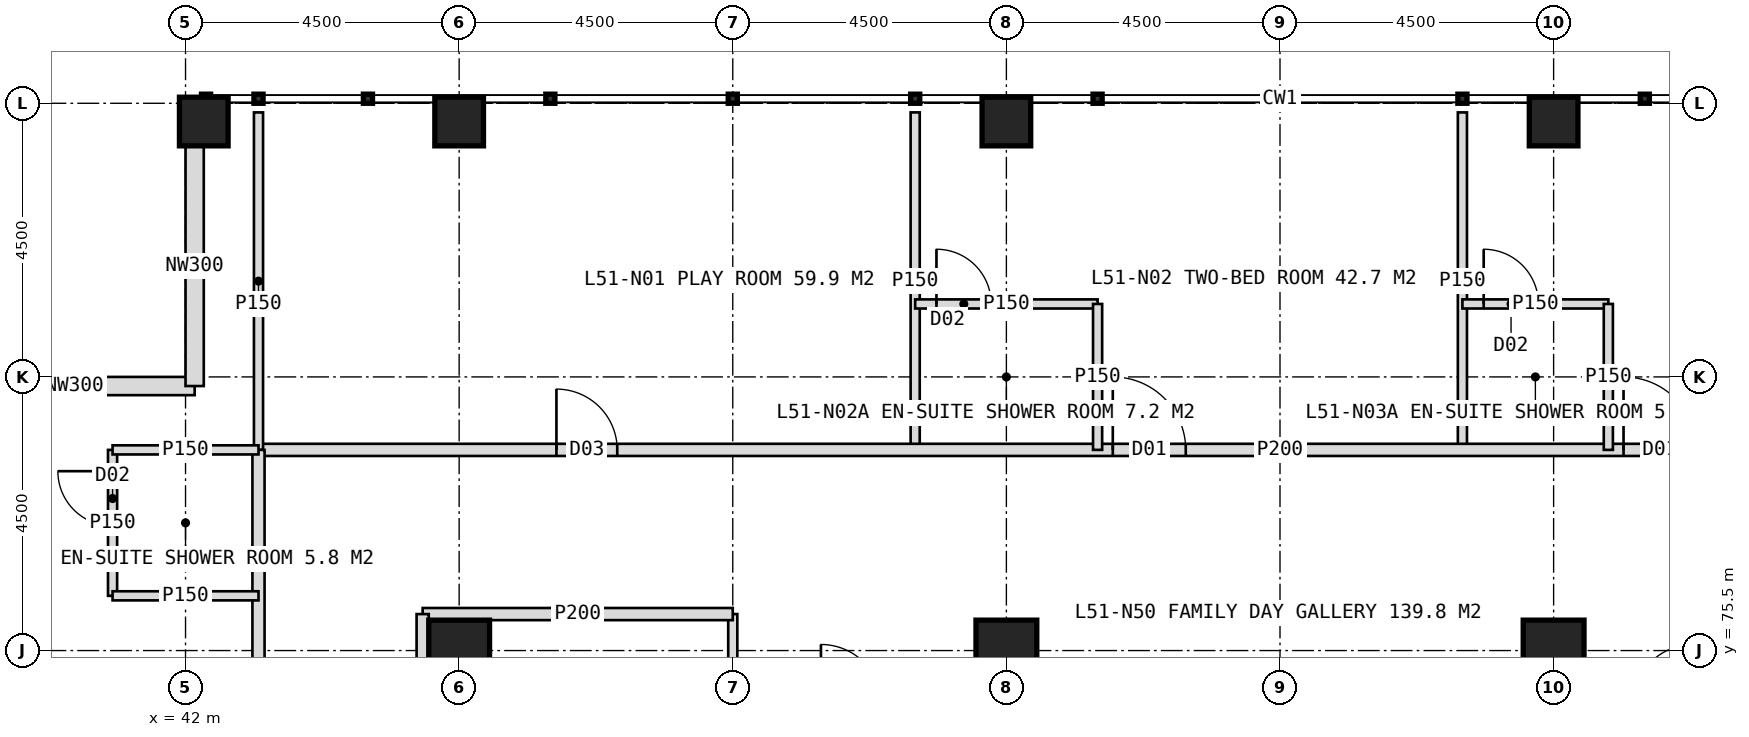
"""IFC4 building model, lengths in metres.
Left out: names, types, materials, properties, quantities, classifications, styles, units other than length and angle.
Written with IfcOpenShell. Run it as: python <this file> out.ifc"""

import sys

from ifc_helpers import new_model, si_unit, direction, frame, frame_2d, origin, origin_2d, place, context, subcontext, project, spatial, rectangle, hollow_rectangle, extrude, element, fill, save


model = new_model("IFC4")
c1 = context("Model", 3, precision=1e-05, world=origin(), true_north=direction((0.0, 1.0)))
c2 = subcontext(c1, "Body", "Model", "MODEL_VIEW")
j1 = project(units=[si_unit("LENGTHUNIT", "METRE"), si_unit("PLANEANGLEUNIT", "RADIAN")], contexts=[c1])
p1 = place(None, origin())
s1 = spatial("IfcSite", under=j1, at=p1, CompositionType="ELEMENT")
p2 = place(p1, origin())
s2 = spatial("IfcBuilding", under=s1, at=p2, CompositionType="ELEMENT")
p3 = place(p2, frame((0.0, 0.0, 213.0)))
s3 = spatial("IfcBuildingStorey", under=s2, at=p3, CompositionType="ELEMENT", Elevation=213.0)
for number, where, z_axis, x_axis in (
    (1, (46.5, 75.5, 0.0), (0.0, 0.0, 1.0), (1.0, 0.0, 0.0)),
    (2, (55.5, 75.5, 0.0), (0.0, 0.0, 1.0), (1.0, 0.0, 0.0)),
    (3, (64.5, 75.5, 0.0), (0.0, 0.0, 1.0), (1.0, 0.0, 0.0)),
):
    element("IfcColumn", number, at=place(p3, frame(where, z_axis=z_axis, x_axis=x_axis)), inside=s3, PredefinedType="COLUMN", context=c2, shape_type="SweptSolid", body=[
        extrude(hollow_rectangle(XDim=1.0, YDim=1.0, WallThickness=0.1, at=origin_2d()), origin(), (0.0, 0.0, 1.0), 4.0),
    ])
for number, where, z_axis, x_axis in (
    (4, (42.3, 84.2, 0.0), (0.0, 0.0, 1.0), (1.0, 0.0, 0.0)),
    (5, (46.5, 84.2, 0.0), (0.0, 0.0, 1.0), (1.0, 0.0, 0.0)),
    (6, (55.5, 84.2, 0.0), (0.0, 0.0, 1.0), (1.0, 0.0, 0.0)),
    (7, (64.5, 84.2, 0.0), (0.0, 0.0, 1.0), (1.0, 0.0, 0.0)),
):
    element("IfcColumn", number, at=place(p3, frame(where, z_axis=z_axis, x_axis=x_axis)), inside=s3, PredefinedType="COLUMN", context=c2, shape_type="SweptSolid", body=[
        extrude(hollow_rectangle(XDim=0.8, YDim=0.8, WallThickness=0.08, at=origin_2d()), origin(), (0.0, 0.0, 1.0), 4.0),
    ])
for number, where, z_axis, x_axis in (
    (8, (38.2, 79.85, 0.0), (0.0, 0.0, 1.0), (1.0, 0.0, 0.0)),
    (9, (42.15, 79.85, 0.0), (0.0, 0.0, 1.0), (0.0, 1.0, 0.0)),
):
    element("IfcWall", number, at=place(p3, frame(where, z_axis=z_axis, x_axis=x_axis)), inside=s3, PredefinedType="ELEMENTEDWALL", context=c2, shape_type="SweptSolid", body=[
        extrude(rectangle(XDim=3.95, YDim=0.3, at=frame_2d((1.975, 0.0))), origin(), (0.0, 0.0, 1.0), 2.85),
    ])
for number, where, z_axis, x_axis in (
    (10, (54.0, 78.8, 0.0), (0.0, 0.0, 1.0), (0.0, 1.0, 0.0)),
    (11, (63.0, 78.8, 0.0), (0.0, 0.0, 1.0), (0.0, 1.0, 0.0)),
):
    element("IfcWall", number, at=place(p3, frame(where, z_axis=z_axis, x_axis=x_axis)), inside=s3, PredefinedType="PARTITIONING", context=c2, shape_type="SweptSolid", body=[
        extrude(rectangle(XDim=5.55, YDim=0.15, at=frame_2d((2.775, 0.0))), origin(), (0.0, 0.0, 1.0), 3.75),
    ])
p4 = place(p3, frame((43.2, 78.8, 0.0), z_axis=(0.0, 0.0, 1.0), x_axis=(1.0, 0.0, 0.0)))
e12 = element("IfcWall", 12, at=p4, inside=s3, PredefinedType="PARTITIONING", context=c2, shape_type="SweptSolid", body=[
    extrude(rectangle(XDim=33.6, YDim=0.2, at=frame_2d((16.8, 0.0))), origin(), (0.0, 0.0, 1.0), 3.75),
])
p5 = place(p4, frame((4.9, 0.0, 0.0)))
e13 = element("IfcOpeningElement", 13, at=p5, cuts=e12, PredefinedType="OPENING", context=c2, shape_type="SweptSolid", body=[
    extrude(rectangle(XDim=1.0, YDim=2.1, at=frame_2d((0.5, 1.05))), frame((0.0, 0.11, 0.0), z_axis=(0.0, -1.0, 0.0), x_axis=(1.0, 0.0, 0.0)), (0.0, 0.0, 1.0), 0.22),
])
p6 = place(p4, frame((14.05, 0.0, 0.0)))
e14 = element("IfcOpeningElement", 14, at=p6, cuts=e12, PredefinedType="OPENING", context=c2, shape_type="SweptSolid", body=[
    extrude(rectangle(XDim=1.2, YDim=2.2, at=frame_2d((0.6, 1.1))), frame((0.0, 0.11, 0.0), z_axis=(0.0, -1.0, 0.0), x_axis=(1.0, 0.0, 0.0)), (0.0, 0.0, 1.0), 0.22),
])
p7 = place(p4, frame((22.45, 0.0, 0.0)))
e15 = element("IfcOpeningElement", 15, at=p7, cuts=e12, PredefinedType="OPENING", context=c2, shape_type="SweptSolid", body=[
    extrude(rectangle(XDim=1.2, YDim=2.2, at=frame_2d((0.6, 1.1))), frame((0.0, 0.11, 0.0), z_axis=(0.0, -1.0, 0.0), x_axis=(1.0, 0.0, 0.0)), (0.0, 0.0, 1.0), 0.22),
])
p8 = place(p3, frame((43.2, 78.8, 0.0), z_axis=(0.0, 0.0, 1.0), x_axis=(0.0, 1.0, 0.0)))
e16 = element("IfcWall", 16, at=p8, inside=s3, PredefinedType="PARTITIONING", context=c2, shape_type="SweptSolid", body=[
    extrude(rectangle(XDim=5.55, YDim=0.15, at=frame_2d((2.775, 0.0))), origin(), (0.0, 0.0, 1.0), 3.75),
])
p9 = place(p3, frame((54.0, 81.2, 0.0), z_axis=(0.0, 0.0, 1.0), x_axis=(1.0, 0.0, 0.0)))
e17 = element("IfcWall", 17, at=p9, inside=s3, PredefinedType="PARTITIONING", context=c2, shape_type="SweptSolid", body=[
    extrude(rectangle(XDim=3.0, YDim=0.15, at=frame_2d((1.5, 0.0))), origin(), (0.0, 0.0, 1.0), 3.75),
])
p10 = place(p9, frame((0.35, 0.0, 0.0)))
e18 = element("IfcOpeningElement", 18, at=p10, cuts=e17, PredefinedType="OPENING", context=c2, shape_type="SweptSolid", body=[
    extrude(rectangle(XDim=0.9, YDim=2.1, at=frame_2d((0.45, 1.05))), frame((0.0, 0.085, 0.0), z_axis=(0.0, -1.0, 0.0), x_axis=(1.0, 0.0, 0.0)), (0.0, 0.0, 1.0), 0.17),
])
p11 = place(p3, frame((57.0, 78.8, 0.0), z_axis=(0.0, 0.0, 1.0), x_axis=(0.0, 1.0, 0.0)))
e19 = element("IfcWall", 19, at=p11, inside=s3, PredefinedType="PARTITIONING", context=c2, shape_type="SweptSolid", body=[
    extrude(rectangle(XDim=2.4, YDim=0.15, at=frame_2d((1.2, 0.0))), origin(), (0.0, 0.0, 1.0), 3.75),
])
p12 = place(p3, frame((63.0, 81.2, 0.0), z_axis=(0.0, 0.0, 1.0), x_axis=(1.0, 0.0, 0.0)))
e20 = element("IfcWall", 20, at=p12, inside=s3, PredefinedType="PARTITIONING", context=c2, shape_type="SweptSolid", body=[
    extrude(rectangle(XDim=2.4, YDim=0.15, at=frame_2d((1.2, 0.0))), origin(), (0.0, 0.0, 1.0), 3.75),
])
p13 = place(p12, frame((0.35, 0.0, 0.0)))
e21 = element("IfcOpeningElement", 21, at=p13, cuts=e20, PredefinedType="OPENING", context=c2, shape_type="SweptSolid", body=[
    extrude(rectangle(XDim=0.9, YDim=2.1, at=frame_2d((0.45, 1.05))), frame((0.0, 0.085, 0.0), z_axis=(0.0, -1.0, 0.0), x_axis=(1.0, 0.0, 0.0)), (0.0, 0.0, 1.0), 0.17),
])
p14 = place(p3, frame((65.4, 78.8, 0.0), z_axis=(0.0, 0.0, 1.0), x_axis=(0.0, 1.0, 0.0)))
e22 = element("IfcWall", 22, at=p14, inside=s3, PredefinedType="PARTITIONING", context=c2, shape_type="SweptSolid", body=[
    extrude(rectangle(XDim=2.4, YDim=0.15, at=frame_2d((1.2, 0.0))), origin(), (0.0, 0.0, 1.0), 3.75),
])
p15 = place(p3, frame((51.0, 71.0, 0.0), z_axis=(0.0, 0.0, 1.0), x_axis=(0.0, 1.0, 0.0)))
e23 = element("IfcWall", 23, at=p15, inside=s3, PredefinedType="PARTITIONING", context=c2, shape_type="SweptSolid", body=[
    extrude(rectangle(XDim=5.1, YDim=0.15, at=frame_2d((2.55, 0.0))), origin(), (0.0, 0.0, 1.0), 3.75),
])
p16 = place(p3, frame((45.9, 76.1, 0.0), z_axis=(0.0, 0.0, 1.0), x_axis=(1.0, 0.0, 0.0)))
e24 = element("IfcWall", 24, at=p16, inside=s3, PredefinedType="PARTITIONING", context=c2, shape_type="SweptSolid", body=[
    extrude(rectangle(XDim=5.1, YDim=0.2, at=frame_2d((2.55, 0.0))), origin(), (0.0, 0.0, 1.0), 3.75),
])
p17 = place(p3, frame((43.2, 45.2, 0.0), z_axis=(0.0, 0.0, 1.0), x_axis=(0.0, 1.0, 0.0)))
e25 = element("IfcWall", 25, at=p17, inside=s3, PredefinedType="PARTITIONING", context=c2, shape_type="SweptSolid", body=[
    extrude(rectangle(XDim=33.6, YDim=0.2, at=frame_2d((16.8, 0.0))), origin(), (0.0, 0.0, 1.0), 3.75),
])
p18 = place(p17, frame((3.25, 0.0, 0.0)))
e26 = element("IfcOpeningElement", 26, at=p18, cuts=e25, PredefinedType="OPENING", context=c2, shape_type="SweptSolid", body=[
    extrude(rectangle(XDim=1.2, YDim=2.2, at=frame_2d((0.6, 1.1))), frame((0.0, 0.11, 0.0), z_axis=(0.0, -1.0, 0.0), x_axis=(1.0, 0.0, 0.0)), (0.0, 0.0, 1.0), 0.22),
])
p19 = place(p17, frame((11.05, 0.0, 0.0)))
e27 = element("IfcOpeningElement", 27, at=p19, cuts=e25, PredefinedType="OPENING", context=c2, shape_type="SweptSolid", body=[
    extrude(rectangle(XDim=1.2, YDim=2.2, at=frame_2d((0.6, 1.1))), frame((0.0, 0.11, 0.0), z_axis=(0.0, -1.0, 0.0), x_axis=(1.0, 0.0, 0.0)), (0.0, 0.0, 1.0), 0.22),
])
p20 = place(p17, frame((20.05, 0.0, 0.0)))
e28 = element("IfcOpeningElement", 28, at=p20, cuts=e25, PredefinedType="OPENING", context=c2, shape_type="SweptSolid", body=[
    extrude(rectangle(XDim=1.2, YDim=2.2, at=frame_2d((0.6, 1.1))), frame((0.0, 0.11, 0.0), z_axis=(0.0, -1.0, 0.0), x_axis=(1.0, 0.0, 0.0)), (0.0, 0.0, 1.0), 0.22),
])
p21 = place(p17, frame((26.95, 0.0, 0.0)))
e29 = element("IfcOpeningElement", 29, at=p21, cuts=e25, PredefinedType="OPENING", context=c2, shape_type="SweptSolid", body=[
    extrude(rectangle(XDim=1.2, YDim=2.2, at=frame_2d((0.6, 1.1))), frame((0.0, 0.11, 0.0), z_axis=(0.0, -1.0, 0.0), x_axis=(1.0, 0.0, 0.0)), (0.0, 0.0, 1.0), 0.22),
])
p22 = place(p3, frame((40.8, 76.4, 0.0), z_axis=(0.0, 0.0, 1.0), x_axis=(0.0, 1.0, 0.0)))
e30 = element("IfcWall", 30, at=p22, inside=s3, PredefinedType="PARTITIONING", context=c2, shape_type="SweptSolid", body=[
    extrude(rectangle(XDim=2.4, YDim=0.15, at=frame_2d((1.2, 0.0))), origin(), (0.0, 0.0, 1.0), 3.75),
])
p23 = place(p22, frame((1.15, 0.0, 0.0)))
e31 = element("IfcOpeningElement", 31, at=p23, cuts=e30, PredefinedType="OPENING", context=c2, shape_type="SweptSolid", body=[
    extrude(rectangle(XDim=0.9, YDim=2.1, at=frame_2d((0.45, 1.05))), frame((0.0, 0.085, 0.0), z_axis=(0.0, -1.0, 0.0), x_axis=(1.0, 0.0, 0.0)), (0.0, 0.0, 1.0), 0.17),
])
for number, where, z_axis, x_axis in (
    (32, (43.2, 76.4, 0.0), (0.0, 0.0, 1.0), (-1.0, 0.0, 0.0)),
    (33, (43.2, 78.8, 0.0), (0.0, 0.0, 1.0), (-1.0, 0.0, 0.0)),
):
    element("IfcWall", number, at=place(p3, frame(where, z_axis=z_axis, x_axis=x_axis)), inside=s3, PredefinedType="PARTITIONING", context=c2, shape_type="SweptSolid", body=[
        extrude(rectangle(XDim=2.4, YDim=0.15, at=frame_2d((1.2, 0.0))), origin(), (0.0, 0.0, 1.0), 3.75),
    ])
p24 = place(p3, frame((45.9, 62.0, 0.0), z_axis=(0.0, 0.0, 1.0), x_axis=(0.0, 1.0, 0.0)))
e34 = element("IfcWall", 34, at=p24, inside=s3, PredefinedType="PARTITIONING", context=c2, shape_type="SweptSolid", body=[
    extrude(rectangle(XDim=14.1, YDim=0.2, at=frame_2d((7.05, 0.0))), origin(), (0.0, 0.0, 1.0), 3.75),
])
p25 = place(p24, frame((1.45, 0.0, 0.0)))
e35 = element("IfcOpeningElement", 35, at=p25, cuts=e34, PredefinedType="OPENING", context=c2, shape_type="SweptSolid", body=[
    extrude(rectangle(XDim=1.0, YDim=2.1, at=frame_2d((0.5, 1.05))), frame((0.0, 0.11, 0.0), z_axis=(0.0, -1.0, 0.0), x_axis=(1.0, 0.0, 0.0)), (0.0, 0.0, 1.0), 0.22),
])
p26 = place(p24, frame((10.3, 0.0, 0.0)))
e36 = element("IfcOpeningElement", 36, at=p26, cuts=e34, PredefinedType="OPENING", context=c2, shape_type="SweptSolid", body=[
    extrude(rectangle(XDim=1.0, YDim=2.1, at=frame_2d((0.5, 1.05))), frame((0.0, 0.11, 0.0), z_axis=(0.0, -1.0, 0.0), x_axis=(1.0, 0.0, 0.0)), (0.0, 0.0, 1.0), 0.22),
])
p27 = place(p5, origin())
e37 = element("IfcDoor", 37, at=p27, inside=s3, OperationType="SINGLE_SWING_LEFT", PredefinedType="DOOR", context=c2, shape_type="SweptSolid", body=[
    extrude(rectangle(XDim=1.0, YDim=2.1, at=frame_2d((0.5, 1.05))), frame((0.0, 0.025, 0.0), z_axis=(0.0, -1.0, 0.0), x_axis=(1.0, 0.0, 0.0)), (0.0, 0.0, 1.0), 0.05),
])
fill(e13, e37)
p28 = place(p6, origin())
e38 = element("IfcDoor", 38, at=p28, inside=s3, OperationType="SINGLE_SWING_LEFT", PredefinedType="DOOR", context=c2, shape_type="SweptSolid", body=[
    extrude(rectangle(XDim=1.2, YDim=2.2, at=frame_2d((0.6, 1.1))), frame((0.0, 0.025, 0.0), z_axis=(0.0, -1.0, 0.0), x_axis=(1.0, 0.0, 0.0)), (0.0, 0.0, 1.0), 0.05),
])
fill(e14, e38)
p29 = place(p10, origin())
e39 = element("IfcDoor", 39, at=p29, inside=s3, OperationType="SINGLE_SWING_LEFT", PredefinedType="DOOR", context=c2, shape_type="SweptSolid", body=[
    extrude(rectangle(XDim=0.9, YDim=2.1, at=frame_2d((0.45, 1.05))), frame((0.0, 0.025, 0.0), z_axis=(0.0, -1.0, 0.0), x_axis=(1.0, 0.0, 0.0)), (0.0, 0.0, 1.0), 0.05),
])
fill(e18, e39)
p30 = place(p7, origin())
e40 = element("IfcDoor", 40, at=p30, inside=s3, OperationType="SINGLE_SWING_LEFT", PredefinedType="DOOR", context=c2, shape_type="SweptSolid", body=[
    extrude(rectangle(XDim=1.2, YDim=2.2, at=frame_2d((0.6, 1.1))), frame((0.0, 0.025, 0.0), z_axis=(0.0, -1.0, 0.0), x_axis=(1.0, 0.0, 0.0)), (0.0, 0.0, 1.0), 0.05),
])
fill(e15, e40)
p31 = place(p13, origin())
e41 = element("IfcDoor", 41, at=p31, inside=s3, OperationType="SINGLE_SWING_LEFT", PredefinedType="DOOR", context=c2, shape_type="SweptSolid", body=[
    extrude(rectangle(XDim=0.9, YDim=2.1, at=frame_2d((0.45, 1.05))), frame((0.0, 0.025, 0.0), z_axis=(0.0, -1.0, 0.0), x_axis=(1.0, 0.0, 0.0)), (0.0, 0.0, 1.0), 0.05),
])
fill(e21, e41)
p32 = place(p23, origin())
e42 = element("IfcDoor", 42, at=p32, inside=s3, OperationType="SINGLE_SWING_RIGHT", PredefinedType="DOOR", context=c2, shape_type="SweptSolid", body=[
    extrude(rectangle(XDim=0.9, YDim=2.1, at=frame_2d((0.45, 1.05))), frame((0.0, 0.025, 0.0), z_axis=(0.0, -1.0, 0.0), x_axis=(1.0, 0.0, 0.0)), (0.0, 0.0, 1.0), 0.05),
])
fill(e31, e42)
save(model, sys.argv[1])
